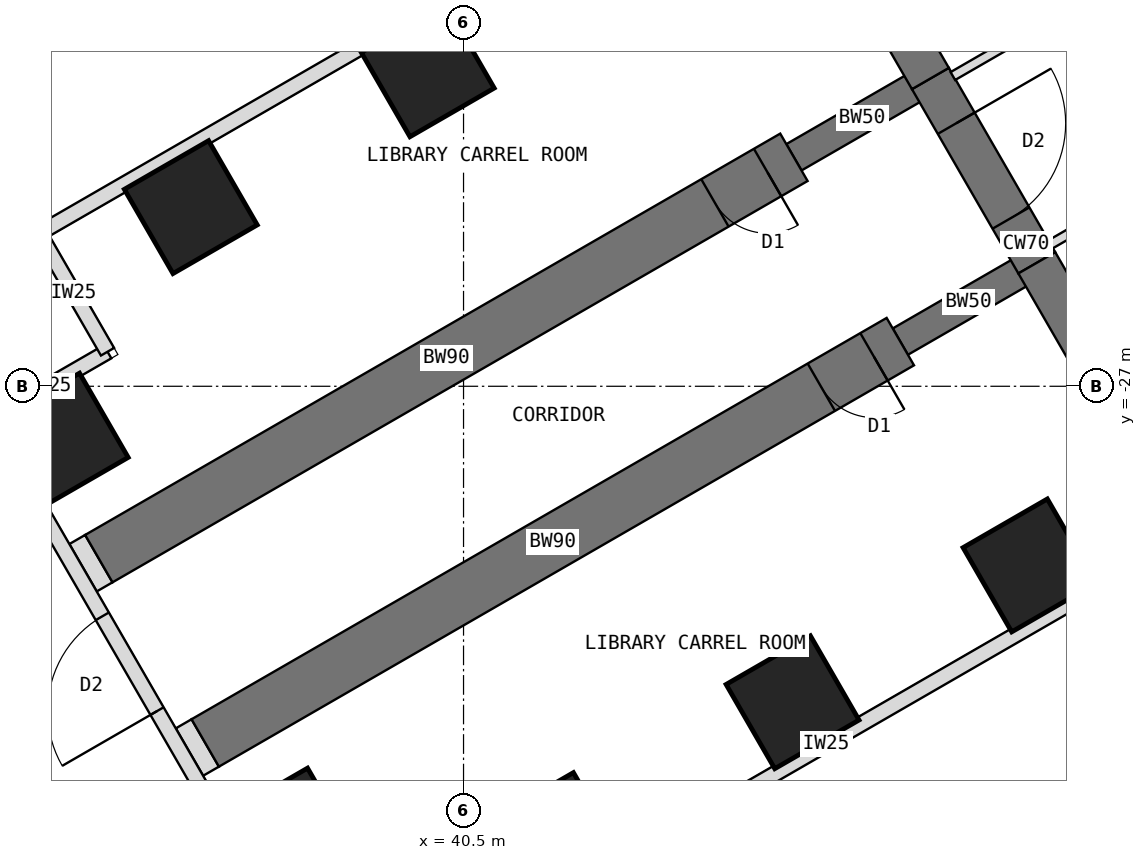
"""IFC4 building model, lengths in metres.
Left out: names, types, materials, properties, quantities, classifications, styles, units other than length and angle.
Written with IfcOpenShell. Run it as: python <this file> out.ifc"""

import sys

from ifc_helpers import new_model, si_unit, direction, frame, frame_2d, origin, origin_2d, place, context, subcontext, project, spatial, rectangle, extrude, element, fill, save


model = new_model("IFC4")
c1 = context("Model", 3, precision=1e-05, world=origin(), true_north=direction((0.0, 1.0)))
c2 = subcontext(c1, "Body", "Model", "MODEL_VIEW")
j1 = project(units=[si_unit("LENGTHUNIT", "METRE"), si_unit("PLANEANGLEUNIT", "RADIAN")], contexts=[c1])
p1 = place(None, origin())
s1 = spatial("IfcSite", under=j1, at=p1, CompositionType="ELEMENT")
p2 = place(p1, origin())
s2 = spatial("IfcBuilding", under=s1, at=p2, CompositionType="ELEMENT")
p3 = place(p2, frame((0.0, 0.0, 10.5)))
s3 = spatial("IfcBuildingStorey", under=s2, at=p3, CompositionType="ELEMENT", Elevation=10.5)
p4 = place(p3, frame((45.904, -18.0, 0.0), z_axis=(0.0, 0.0, 1.0), x_axis=(0.500024481964, -0.866011268655, 0.0)))
e1 = element("IfcWall", 1, at=p4, inside=s3, PredefinedType="SHEAR", context=c2, shape_type="SweptSolid", body=[
    extrude(rectangle(XDim=4.548, YDim=0.7, at=frame_2d((2.274, 0.0))), origin(), (0.0, 0.0, 1.0), 5.0),
])
p5 = place(p3, frame((48.178, -21.939, 0.0), z_axis=(0.0, 0.0, 1.0), x_axis=(0.500010275428, -0.866019471182, 0.0)))
e2 = element("IfcWall", 2, at=p5, inside=s3, PredefinedType="SHEAR", context=c2, shape_type="SweptSolid", body=[
    extrude(rectangle(XDim=3.5, YDim=0.7, at=frame_2d((1.75, 0.0))), origin(), (0.0, 0.0, 1.0), 5.0),
])
p6 = place(p5, frame((0.85, 0.0, 0.0)))
e3 = element("IfcOpeningElement", 3, at=p6, cuts=e2, PredefinedType="OPENING", context=c2, shape_type="SweptSolid", body=[
    extrude(rectangle(XDim=1.8, YDim=2.1, at=frame_2d((0.9, 1.05))), frame((0.0, 0.36, 0.0), z_axis=(0.0, -1.0, 0.0), x_axis=(1.0, 0.0, 0.0)), (0.0, 0.0, 1.0), 0.72),
])
p7 = place(p3, frame((49.928, -24.97, 0.0), z_axis=(0.0, 0.0, 1.0), x_axis=(0.499984222037, -0.866034513004, 0.0)))
e4 = element("IfcWall", 4, at=p7, inside=s3, PredefinedType="SHEAR", context=c2, shape_type="SweptSolid", body=[
    extrude(rectangle(XDim=4.548, YDim=0.7, at=frame_2d((2.274, 0.0))), origin(), (0.0, 0.0, 1.0), 5.0),
])
p8 = place(p3, frame((49.928, -24.97, 0.0), z_axis=(0.0, 0.0, 1.0), x_axis=(-0.866031863473, -0.499988811324, 0.0)))
e5 = element("IfcWall", 5, at=p8, inside=s3, PredefinedType="SHEAR", context=c2, shape_type="SweptSolid", body=[
    extrude(rectangle(XDim=2.592, YDim=0.5, at=frame_2d((1.296, 0.0))), origin(), (0.0, 0.0, 1.0), 5.0),
])
p9 = place(p3, frame((47.684, -26.266, 0.0), z_axis=(0.0, 0.0, 1.0), x_axis=(-0.866027579429, -0.499996231654, 0.0)))
e6 = element("IfcWall", 6, at=p9, inside=s3, PredefinedType="SHEAR", context=c2, shape_type="SweptSolid", body=[
    extrude(rectangle(XDim=13.2, YDim=0.9, at=frame_2d((6.6, 0.0))), origin(), (0.0, 0.0, 1.0), 5.0),
])
p10 = place(p9, frame((0.5, 0.0, 0.0)))
e7 = element("IfcOpeningElement", 7, at=p10, cuts=e6, PredefinedType="OPENING", context=c2, shape_type="SweptSolid", body=[
    extrude(rectangle(XDim=1.0, YDim=2.1, at=frame_2d((0.5, 1.05))), frame((0.0, 0.46, 0.0), z_axis=(0.0, -1.0, 0.0), x_axis=(1.0, 0.0, 0.0)), (0.0, 0.0, 1.0), 0.92),
])
p11 = place(p3, frame((48.178, -21.939, 0.0), z_axis=(0.0, 0.0, 1.0), x_axis=(-0.866072649678, -0.499918158782, 0.0)))
e8 = element("IfcWall", 8, at=p11, inside=s3, PredefinedType="SHEAR", context=c2, shape_type="SweptSolid", body=[
    extrude(rectangle(XDim=2.592, YDim=0.5, at=frame_2d((1.296, 0.0))), origin(), (0.0, 0.0, 1.0), 5.0),
])
p12 = place(p3, frame((45.934, -23.234, 0.0), z_axis=(0.0, 0.0, 1.0), x_axis=(-0.866019570528, -0.500010103361, 0.0)))
e9 = element("IfcWall", 9, at=p12, inside=s3, PredefinedType="SHEAR", context=c2, shape_type="SweptSolid", body=[
    extrude(rectangle(XDim=13.2, YDim=0.9, at=frame_2d((6.6, 0.0))), origin(), (0.0, 0.0, 1.0), 5.0),
])
p13 = place(p12, frame((0.5, 0.0, 0.0)))
e10 = element("IfcOpeningElement", 10, at=p13, cuts=e9, PredefinedType="OPENING", context=c2, shape_type="SweptSolid", body=[
    extrude(rectangle(XDim=1.0, YDim=2.1, at=frame_2d((0.5, 1.05))), frame((0.0, 0.46, 0.0), z_axis=(0.0, -1.0, 0.0), x_axis=(1.0, 0.0, 0.0)), (0.0, 0.0, 1.0), 0.92),
])
for number, where, z_axis, x_axis in (
    (11, (49.809, -29.946, 0.0), (0.0, 0.0, 1.0), (0.866, 0.5, 0.0)),
    (12, (45.912, -32.196, 0.0), (0.0, 0.0, 1.0), (0.866, 0.5, 0.0)),
    (13, (39.912, -21.804, 0.0), (0.0, 0.0, 1.0), (0.866, 0.5, 0.0)),
    (14, (42.014, -34.446, 0.0), (0.0, 0.0, 1.0), (0.866, 0.5, 0.0)),
    (15, (36.014, -24.054, 0.0), (0.0, 0.0, 1.0), (0.866, 0.5, 0.0)),
    (16, (37.642, -34.373, 0.0), (0.0, 0.0, 1.0), (0.866, 0.5, 0.0)),
    (17, (33.892, -27.877, 0.0), (0.0, 0.0, 1.0), (0.866, 0.5, 0.0)),
):
    element("IfcColumn", number, at=place(p3, frame(where, z_axis=z_axis, x_axis=x_axis)), inside=s3, PredefinedType="COLUMN", context=c2, shape_type="SweptSolid", body=[
        extrude(rectangle(XDim=1.6, YDim=1.6, at=origin_2d()), origin(), (0.0, 0.0, 1.0), 5.0),
    ])
p14 = place(p3, frame((36.252, -32.865, 0.0), z_axis=(0.0, 0.0, 1.0), x_axis=(-0.865778900179, -0.500426713919, 0.0)))
e18 = element("IfcWall", 18, at=p14, inside=s3, PredefinedType="PARTITIONING", context=c2, shape_type="SweptSolid", body=[
    extrude(rectangle(XDim=0.3, YDim=0.9, at=frame_2d((0.15, 0.0))), origin(), (0.0, 0.0, 1.0), 4.65),
])
p15 = place(p3, frame((34.502, -29.834, 0.0), z_axis=(0.0, 0.0, 1.0), x_axis=(-0.866131372301, -0.499816412211, 0.0)))
e19 = element("IfcWall", 19, at=p15, inside=s3, PredefinedType="PARTITIONING", context=c2, shape_type="SweptSolid", body=[
    extrude(rectangle(XDim=0.3, YDim=0.9, at=frame_2d((0.15, 0.0))), origin(), (0.0, 0.0, 1.0), 4.65),
])
p16 = place(p3, frame((54.017, -22.436, 0.0), z_axis=(0.0, 0.0, 1.0), x_axis=(-0.866015446554, -0.500017246033, 0.0)))
e20 = element("IfcWall", 20, at=p16, inside=s3, PredefinedType="PARTITIONING", context=c2, shape_type="SweptSolid", body=[
    extrude(rectangle(XDim=4.469, YDim=0.15, at=frame_2d((2.234, 0.0))), origin(), (0.0, 0.0, 1.0), 4.65),
])
p17 = place(p16, frame((1.744, 0.0, 0.0)))
e21 = element("IfcOpeningElement", 21, at=p17, cuts=e20, PredefinedType="OPENING", context=c2, shape_type="SweptSolid", body=[
    extrude(rectangle(XDim=1.0, YDim=2.1, at=frame_2d((0.5, 1.05))), frame((0.0, 0.085, 0.0), z_axis=(0.0, -1.0, 0.0), x_axis=(1.0, 0.0, 0.0)), (0.0, 0.0, 1.0), 0.17),
])
p18 = place(p3, frame((48.548, -21.898, 0.0), z_axis=(0.0, 0.0, 1.0), x_axis=(0.866025445582, 0.499999927604, 0.0)))
e22 = element("IfcWall", 22, at=p18, inside=s3, PredefinedType="PARTITIONING", context=c2, shape_type="SweptSolid", body=[
    extrude(rectangle(XDim=4.468, YDim=0.15, at=frame_2d((2.234, 0.0))), origin(), (0.0, 0.0, 1.0), 4.65),
])
p19 = place(p18, frame((1.724, 0.0, 0.0)))
e23 = element("IfcOpeningElement", 23, at=p19, cuts=e22, PredefinedType="OPENING", context=c2, shape_type="SweptSolid", body=[
    extrude(rectangle(XDim=1.0, YDim=2.1, at=frame_2d((0.5, 1.05))), frame((0.0, 0.085, 0.0), z_axis=(0.0, -1.0, 0.0), x_axis=(1.0, 0.0, 0.0)), (0.0, 0.0, 1.0), 0.17),
])
p20 = place(p3, frame((52.533, -29.383, 0.0), z_axis=(0.0, 0.0, 1.0), x_axis=(-0.866027500821, -0.499996367808, 0.0)))
e24 = element("IfcWall", 24, at=p20, inside=s3, PredefinedType="STANDARD", context=c2, shape_type="SweptSolid", body=[
    extrude(rectangle(XDim=14.016, YDim=0.25, at=frame_2d((7.008, 0.0))), origin(), (0.0, 0.0, 1.0), 4.65),
])
p21 = place(p3, frame((37.322, -35.568, 0.0), z_axis=(0.0, 0.0, 1.0), x_axis=(-0.499999662836, 0.866025598446, 0.0)))
e25 = element("IfcWall", 25, at=p21, inside=s3, PredefinedType="STANDARD", context=c2, shape_type="SweptSolid", body=[
    extrude(rectangle(XDim=9.25, YDim=0.25, at=frame_2d((4.625, 0.0))), origin(), (0.0, 0.0, 1.0), 4.65),
])
p22 = place(p21, frame((3.725, 0.0, 0.0)))
e26 = element("IfcOpeningElement", 26, at=p22, cuts=e25, PredefinedType="OPENING", context=c2, shape_type="SweptSolid", body=[
    extrude(rectangle(XDim=1.8, YDim=2.1, at=frame_2d((0.9, 1.05))), frame((0.0, 0.135, 0.0), z_axis=(0.0, -1.0, 0.0), x_axis=(1.0, 0.0, 0.0)), (0.0, 0.0, 1.0), 0.27),
])
for number, where, z_axis, x_axis in (
    (27, (32.697, -27.557, 0.0), (0.0, 0.0, 1.0), (0.866, 0.5, 0.0)),
    (28, (34.645, -26.432, 0.0), (0.0, 0.0, 1.0), (-0.5, 0.866, 0.0)),
):
    element("IfcWall", number, at=place(p3, frame(where, z_axis=z_axis, x_axis=x_axis)), inside=s3, PredefinedType="STANDARD", context=c2, shape_type="SweptSolid", body=[
        extrude(rectangle(XDim=2.25, YDim=0.25, at=frame_2d((1.125, 0.0))), origin(), (0.0, 0.0, 1.0), 4.65),
    ])
p23 = place(p3, frame((33.52, -24.484, 0.0), z_axis=(0.0, 0.0, 1.0), x_axis=(0.866027500821, 0.499996367808, 0.0)))
e29 = element("IfcWall", 29, at=p23, inside=s3, PredefinedType="STANDARD", context=c2, shape_type="SweptSolid", body=[
    extrude(rectangle(XDim=14.016, YDim=0.25, at=frame_2d((7.008, 0.0))), origin(), (0.0, 0.0, 1.0), 4.65),
])
p24 = place(p6, origin())
e30 = element("IfcDoor", 30, at=p24, inside=s3, OperationType="DOUBLE_DOOR_DOUBLE_SWING", PredefinedType="DOOR", context=c2, shape_type="SweptSolid", body=[
    extrude(rectangle(XDim=1.72, YDim=2.06, at=frame_2d((0.9, 1.03))), frame((0.0, 0.025, 0.0), z_axis=(0.0, -1.0, 0.0), x_axis=(1.0, 0.0, 0.0)), (0.0, 0.0, 1.0), 0.05),
    extrude(rectangle(XDim=0.04, YDim=2.1, at=frame_2d((0.02, 1.05))), frame((0.0, 0.35, 0.0), z_axis=(0.0, -1.0, 0.0), x_axis=(1.0, 0.0, 0.0)), (0.0, 0.0, 1.0), 0.699),
    extrude(rectangle(XDim=0.04, YDim=2.1, at=frame_2d((1.78, 1.05))), frame((0.0, 0.35, 0.0), z_axis=(0.0, -1.0, 0.0), x_axis=(1.0, 0.0, 0.0)), (0.0, 0.0, 1.0), 0.699),
    extrude(rectangle(XDim=1.72, YDim=0.04, at=frame_2d((0.9, 2.08))), frame((0.0, 0.35, 0.0), z_axis=(0.0, -1.0, 0.0), x_axis=(1.0, 0.0, 0.0)), (0.0, 0.0, 1.0), 0.699),
])
fill(e3, e30)
p25 = place(p10, origin())
e31 = element("IfcDoor", 31, at=p25, inside=s3, OperationType="SINGLE_SWING_LEFT", PredefinedType="DOOR", context=c2, shape_type="SweptSolid", body=[
    extrude(rectangle(XDim=0.92, YDim=2.06, at=frame_2d((0.5, 1.03))), frame((0.0, 0.025, 0.0), z_axis=(0.0, -1.0, 0.0), x_axis=(1.0, 0.0, 0.0)), (0.0, 0.0, 1.0), 0.05),
    extrude(rectangle(XDim=0.04, YDim=2.1, at=frame_2d((0.02, 1.05))), frame((0.0, 0.45, 0.0), z_axis=(0.0, -1.0, 0.0), x_axis=(1.0, 0.0, 0.0)), (0.0, 0.0, 1.0), 0.899),
    extrude(rectangle(XDim=0.04, YDim=2.1, at=frame_2d((0.98, 1.05))), frame((0.0, 0.45, 0.0), z_axis=(0.0, -1.0, 0.0), x_axis=(1.0, 0.0, 0.0)), (0.0, 0.0, 1.0), 0.899),
    extrude(rectangle(XDim=0.92, YDim=0.04, at=frame_2d((0.5, 2.08))), frame((0.0, 0.45, 0.0), z_axis=(0.0, -1.0, 0.0), x_axis=(1.0, 0.0, 0.0)), (0.0, 0.0, 1.0), 0.899),
])
fill(e7, e31)
p26 = place(p13, origin())
e32 = element("IfcDoor", 32, at=p26, inside=s3, OperationType="SINGLE_SWING_LEFT", PredefinedType="DOOR", context=c2, shape_type="SweptSolid", body=[
    extrude(rectangle(XDim=0.92, YDim=2.06, at=frame_2d((0.5, 1.03))), frame((0.0, 0.025, 0.0), z_axis=(0.0, -1.0, 0.0), x_axis=(1.0, 0.0, 0.0)), (0.0, 0.0, 1.0), 0.05),
    extrude(rectangle(XDim=0.04, YDim=2.1, at=frame_2d((0.02, 1.05))), frame((0.0, 0.45, 0.0), z_axis=(0.0, -1.0, 0.0), x_axis=(1.0, 0.0, 0.0)), (0.0, 0.0, 1.0), 0.899),
    extrude(rectangle(XDim=0.04, YDim=2.1, at=frame_2d((0.98, 1.05))), frame((0.0, 0.45, 0.0), z_axis=(0.0, -1.0, 0.0), x_axis=(1.0, 0.0, 0.0)), (0.0, 0.0, 1.0), 0.899),
    extrude(rectangle(XDim=0.92, YDim=0.04, at=frame_2d((0.5, 2.08))), frame((0.0, 0.45, 0.0), z_axis=(0.0, -1.0, 0.0), x_axis=(1.0, 0.0, 0.0)), (0.0, 0.0, 1.0), 0.899),
])
fill(e10, e32)
p27 = place(p22, origin())
e33 = element("IfcDoor", 33, at=p27, inside=s3, OperationType="DOUBLE_DOOR_DOUBLE_SWING", PredefinedType="DOOR", context=c2, shape_type="SweptSolid", body=[
    extrude(rectangle(XDim=1.8, YDim=2.1, at=frame_2d((0.9, 1.05))), frame((0.0, 0.025, 0.0), z_axis=(0.0, -1.0, 0.0), x_axis=(1.0, 0.0, 0.0)), (0.0, 0.0, 1.0), 0.05),
])
fill(e26, e33)
save(model, sys.argv[1])
